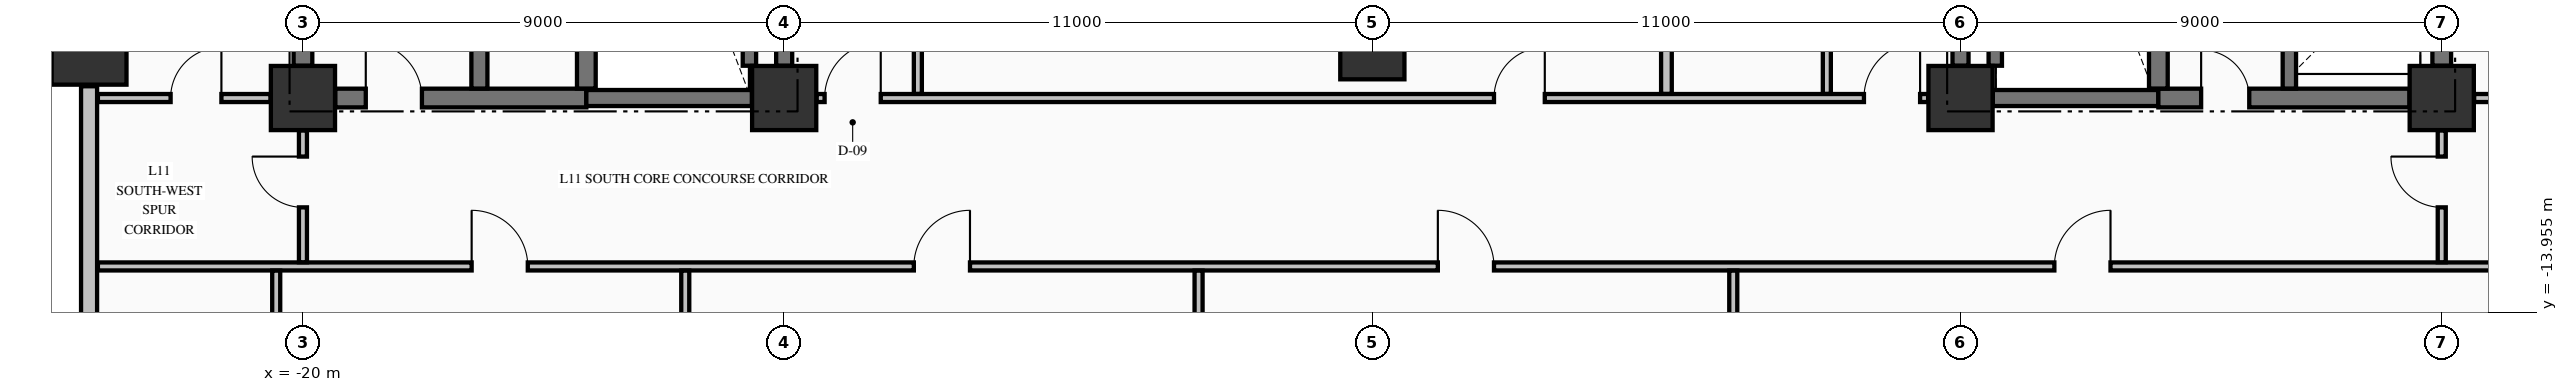
"""IFC4 building model, lengths in metres.
Left out: names, types, materials, properties, quantities, classifications, styles, units other than length and angle.
Written with IfcOpenShell. Run it as: python <this file> out.ifc"""

import sys

from ifc_helpers import new_model, si_unit, direction, frame, frame_2d, origin, origin_2d, place, context, subcontext, project, spatial, rectangle, extrude, element, fill, save


model = new_model("IFC4")
c1 = context("Model", 3, precision=1e-05, world=origin(), true_north=direction((0.0, 1.0)))
c2 = subcontext(c1, "Body", "Model", "MODEL_VIEW")
j1 = project(units=[si_unit("LENGTHUNIT", "METRE"), si_unit("PLANEANGLEUNIT", "RADIAN")], contexts=[c1])
p1 = place(None, origin())
s1 = spatial("IfcSite", under=j1, at=p1, CompositionType="ELEMENT")
p2 = place(p1, origin())
s2 = spatial("IfcBuilding", under=s1, at=p2, CompositionType="ELEMENT")
p3 = place(p2, frame((0.0, 0.0, 48.62)))
s3 = spatial("IfcBuildingStorey", under=s2, at=p3, CompositionType="ELEMENT", Elevation=48.62)
p4 = place(p3, frame((-24.0, -9.0, -0.25), z_axis=(0.0, 0.0, 1.0), x_axis=(1.0, 0.0, 0.0)))
e1 = element("IfcColumn", 1, at=p4, inside=s3, PredefinedType="COLUMN", context=c2, shape_type="SweptSolid", body=[
    extrude(rectangle(XDim=1.4, YDim=1.4, at=origin_2d()), origin(), (0.0, 0.0, 1.0), 3.395),
])
for number, where, z_axis, x_axis in (
    (2, (-20.0, -9.95, -0.25), (0.0, 0.0, 1.0), (1.0, 0.0, 0.0)),
    (3, (-11.0, -9.95, -0.25), (0.0, 0.0, 1.0), (1.0, 0.0, 0.0)),
    (4, (11.0, -9.95, -0.25), (0.0, 0.0, 1.0), (1.0, 0.0, 0.0)),
    (5, (20.0, -9.95, -0.25), (0.0, 0.0, 1.0), (1.0, 0.0, 0.0)),
    (6, (0.0, -9.0, -0.25), (0.0, 0.0, 1.0), (1.0, 0.0, 0.0)),
):
    element("IfcColumn", number, at=place(p3, frame(where, z_axis=z_axis, x_axis=x_axis)), inside=s3, PredefinedType="COLUMN", context=c2, shape_type="SweptSolid", body=[
        extrude(rectangle(XDim=1.2, YDim=1.2, at=origin_2d()), origin(), (0.0, 0.0, 1.0), 3.395),
    ])
p5 = place(p3, frame((-24.0, -9.73, 0.0), z_axis=(0.0, 0.0, 1.0), x_axis=(0.0, -1.0, 0.0)))
e7 = element("IfcWall", 7, at=p5, inside=s3, PredefinedType="STANDARD", context=c2, shape_type="SweptSolid", body=[
    extrude(rectangle(XDim=12.54, YDim=0.3, at=frame_2d((6.27, 0.0))), origin(), (0.0, 0.0, 1.0), 2.537),
])
p6 = place(p3, frame((-19.396, -9.95, 0.0), z_axis=(0.0, 0.0, 1.0), x_axis=(1.0, 0.0, 0.0)))
e8 = element("IfcWall", 8, at=p6, inside=s3, PredefinedType="SHEAR", context=c2, shape_type="SweptSolid", body=[
    extrude(rectangle(XDim=4.696, YDim=0.35, at=frame_2d((2.348, 0.0))), origin(), (0.0, 0.0, 1.0), 3.145),
])
p7 = place(p6, frame((0.571, 0.0, 0.0)))
e9 = element("IfcOpeningElement", 9, at=p7, cuts=e8, PredefinedType="OPENING", context=c2, shape_type="SweptSolid", body=[
    extrude(rectangle(XDim=1.05, YDim=2.15, at=frame_2d((0.525, 1.075))), frame((0.0, 0.185, 0.0), z_axis=(0.0, -1.0, 0.0), x_axis=(1.0, 0.0, 0.0)), (0.0, 0.0, 1.0), 0.37),
])
for number, where, z_axis, x_axis in (
    (10, (-14.7, -9.95, 0.0), (0.0, 0.0, 1.0), (1.0, 0.0, 0.0)),
    (11, (11.604, -9.95, 0.0), (0.0, 0.0, 1.0), (1.0, 0.0, 0.0)),
):
    element("IfcWall", number, at=place(p3, frame(where, z_axis=z_axis, x_axis=x_axis)), inside=s3, PredefinedType="SHEAR", context=c2, shape_type="SweptSolid", body=[
        extrude(rectangle(XDim=3.096, YDim=0.3, at=frame_2d((1.548, 0.0))), origin(), (0.0, 0.0, 1.0), 3.145),
    ])
p8 = place(p3, frame((14.7, -9.95, 0.0), z_axis=(0.0, 0.0, 1.0), x_axis=(1.0, 0.0, 0.0)))
e12 = element("IfcWall", 12, at=p8, inside=s3, PredefinedType="SHEAR", context=c2, shape_type="SweptSolid", body=[
    extrude(rectangle(XDim=4.696, YDim=0.35, at=frame_2d((2.348, 0.0))), origin(), (0.0, 0.0, 1.0), 3.145),
])
p9 = place(p8, frame((0.8, 0.0, 0.0)))
e13 = element("IfcOpeningElement", 13, at=p9, cuts=e12, PredefinedType="OPENING", context=c2, shape_type="SweptSolid", body=[
    extrude(rectangle(XDim=0.9, YDim=2.15, at=frame_2d((0.45, 1.075))), frame((0.0, 0.185, 0.0), z_axis=(0.0, -1.0, 0.0), x_axis=(1.0, 0.0, 0.0)), (0.0, 0.0, 1.0), 0.37),
])
p10 = place(p3, frame((-23.835, -13.1, 0.0), z_axis=(0.0, 0.0, 1.0), x_axis=(1.0, 0.0, 0.0)))
e14 = element("IfcWall", 14, at=p10, inside=s3, PredefinedType="PARTITIONING", context=c2, shape_type="SweptSolid", body=[
    extrude(rectangle(XDim=52.67, YDim=0.15, at=frame_2d((26.335, 0.0))), origin(), (0.0, 0.0, 1.0), 3.145),
])
p11 = place(p10, frame((6.99, 0.0, 0.0)))
e15 = element("IfcOpeningElement", 15, at=p11, cuts=e14, PredefinedType="OPENING", context=c2, shape_type="SweptSolid", body=[
    extrude(rectangle(XDim=1.05, YDim=2.15, at=frame_2d((0.525, 1.075))), frame((0.0, 0.085, 0.0), z_axis=(0.0, -1.0, 0.0), x_axis=(1.0, 0.0, 0.0)), (0.0, 0.0, 1.0), 0.17),
])
p12 = place(p10, frame((15.26, 0.0, 0.0)))
e16 = element("IfcOpeningElement", 16, at=p12, cuts=e14, PredefinedType="OPENING", context=c2, shape_type="SweptSolid", body=[
    extrude(rectangle(XDim=1.05, YDim=2.15, at=frame_2d((0.525, 1.075))), frame((0.0, 0.085, 0.0), z_axis=(0.0, -1.0, 0.0), x_axis=(1.0, 0.0, 0.0)), (0.0, 0.0, 1.0), 0.17),
])
p13 = place(p10, frame((25.06, 0.0, 0.0)))
e17 = element("IfcOpeningElement", 17, at=p13, cuts=e14, PredefinedType="OPENING", context=c2, shape_type="SweptSolid", body=[
    extrude(rectangle(XDim=1.05, YDim=2.15, at=frame_2d((0.525, 1.075))), frame((0.0, 0.085, 0.0), z_axis=(0.0, -1.0, 0.0), x_axis=(1.0, 0.0, 0.0)), (0.0, 0.0, 1.0), 0.17),
])
p14 = place(p10, frame((36.59, 0.0, 0.0)))
e18 = element("IfcOpeningElement", 18, at=p14, cuts=e14, PredefinedType="OPENING", context=c2, shape_type="SweptSolid", body=[
    extrude(rectangle(XDim=1.05, YDim=2.15, at=frame_2d((0.525, 1.075))), frame((0.0, 0.085, 0.0), z_axis=(0.0, -1.0, 0.0), x_axis=(1.0, 0.0, 0.0)), (0.0, 0.0, 1.0), 0.17),
])
p15 = place(p3, frame((-23.835, -9.95, 0.0), z_axis=(0.0, 0.0, 1.0), x_axis=(1.0, 0.0, 0.0)))
e19 = element("IfcWall", 19, at=p15, inside=s3, PredefinedType="PARTITIONING", context=c2, shape_type="SweptSolid", body=[
    extrude(rectangle(XDim=3.229, YDim=0.15, at=frame_2d((1.615, 0.0))), origin(), (0.0, 0.0, 1.0), 3.145),
])
p16 = place(p15, frame((1.36, 0.0, 0.0)))
e20 = element("IfcOpeningElement", 20, at=p16, cuts=e19, PredefinedType="OPENING", context=c2, shape_type="SweptSolid", body=[
    extrude(rectangle(XDim=0.95, YDim=2.15, at=frame_2d((0.475, 1.075))), frame((0.0, 0.085, 0.0), z_axis=(0.0, -1.0, 0.0), x_axis=(1.0, 0.0, 0.0)), (0.0, 0.0, 1.0), 0.17),
])
p17 = place(p3, frame((-10.394, -9.95, 0.0), z_axis=(0.0, 0.0, 1.0), x_axis=(1.0, 0.0, 0.0)))
e21 = element("IfcWall", 21, at=p17, inside=s3, PredefinedType="PARTITIONING", context=c2, shape_type="SweptSolid", body=[
    extrude(rectangle(XDim=20.788, YDim=0.15, at=frame_2d((10.394, 0.0))), origin(), (0.0, 0.0, 1.0), 3.145),
])
p18 = place(p17, frame((0.15, 0.0, 0.0)))
e22 = element("IfcOpeningElement", 22, at=p18, cuts=e21, PredefinedType="OPENING", context=c2, shape_type="SweptSolid", body=[
    extrude(rectangle(XDim=1.05, YDim=2.15, at=frame_2d((0.525, 1.075))), frame((0.0, 0.085, 0.0), z_axis=(0.0, -1.0, 0.0), x_axis=(1.0, 0.0, 0.0)), (0.0, 0.0, 1.0), 0.17),
])
p19 = place(p17, frame((19.588, 0.0, 0.0)))
e23 = element("IfcOpeningElement", 23, at=p19, cuts=e21, PredefinedType="OPENING", context=c2, shape_type="SweptSolid", body=[
    extrude(rectangle(XDim=1.05, YDim=2.15, at=frame_2d((0.525, 1.075))), frame((0.0, 0.085, 0.0), z_axis=(0.0, -1.0, 0.0), x_axis=(1.0, 0.0, 0.0)), (0.0, 0.0, 1.0), 0.17),
])
p20 = place(p17, frame((12.669, 0.0, 0.0)))
e24 = element("IfcOpeningElement", 24, at=p20, cuts=e21, PredefinedType="OPENING", context=c2, shape_type="SweptSolid", body=[
    extrude(rectangle(XDim=0.95, YDim=2.15, at=frame_2d((0.475, 1.075))), frame((0.0, 0.085, 0.0), z_axis=(0.0, -1.0, 0.0), x_axis=(1.0, 0.0, 0.0)), (0.0, 0.0, 1.0), 0.17),
])
p21 = place(p3, frame((20.606, -9.95, 0.0), z_axis=(0.0, 0.0, 1.0), x_axis=(1.0, 0.0, 0.0)))
e25 = element("IfcWall", 25, at=p21, inside=s3, PredefinedType="PARTITIONING", context=c2, shape_type="SweptSolid", body=[
    extrude(rectangle(XDim=8.229, YDim=0.15, at=frame_2d((4.115, 0.0))), origin(), (0.0, 0.0, 1.0), 3.145),
])
p22 = place(p21, frame((3.394, 0.0, 0.0)))
e26 = element("IfcOpeningElement", 26, at=p22, cuts=e25, PredefinedType="OPENING", context=c2, shape_type="SweptSolid", body=[
    extrude(rectangle(XDim=1.0, YDim=2.15, at=frame_2d((0.5, 1.075))), frame((0.0, 0.085, 0.0), z_axis=(0.0, -1.0, 0.0), x_axis=(1.0, 0.0, 0.0)), (0.0, 0.0, 1.0), 0.17),
])
p23 = place(p3, frame((-20.0, -9.346, 0.0), z_axis=(0.0, 0.0, 1.0), x_axis=(0.0, 1.0, 0.0)))
e27 = element("IfcWall", 27, at=p23, inside=s3, PredefinedType="SHEAR", context=c2, shape_type="SweptSolid", body=[
    extrude(rectangle(XDim=8.742, YDim=0.35, at=frame_2d((4.371, 0.0))), origin(), (0.0, 0.0, 1.0), 3.145),
])
p24 = place(p3, frame((-16.7, -9.773, 0.0), z_axis=(0.0, 0.0, 1.0), x_axis=(0.0, 1.0, 0.0)))
e28 = element("IfcWall", 28, at=p24, inside=s3, PredefinedType="SHEAR", context=c2, shape_type="SweptSolid", body=[
    extrude(rectangle(XDim=9.371, YDim=0.3, at=frame_2d((4.686, 0.0))), origin(), (0.0, 0.0, 1.0), 3.145),
])
p25 = place(p3, frame((-14.7, -9.773, 0.0), z_axis=(0.0, 0.0, 1.0), x_axis=(0.0, 1.0, 0.0)))
e29 = element("IfcWall", 29, at=p25, inside=s3, PredefinedType="SHEAR", context=c2, shape_type="SweptSolid", body=[
    extrude(rectangle(XDim=9.371, YDim=0.35, at=frame_2d((4.686, 0.0))), origin(), (0.0, 0.0, 1.0), 3.145),
])
p26 = place(p3, frame((-11.65, -9.346, 0.0), z_axis=(0.0, 0.0, 1.0), x_axis=(0.0, 1.0, 0.0)))
e30 = element("IfcWall", 30, at=p26, inside=s3, PredefinedType="SOLIDWALL", context=c2, shape_type="SweptSolid", body=[
    extrude(rectangle(XDim=8.742, YDim=0.25, at=frame_2d((4.371, 0.0))), origin(), (0.0, 0.0, 1.0), 3.145),
])
for number, where, z_axis, x_axis in (
    (31, (-11.0, -9.346, 0.0), (0.0, 0.0, 1.0), (0.0, 1.0, 0.0)),
    (32, (11.0, -9.346, 0.0), (0.0, 0.0, 1.0), (0.0, 1.0, 0.0)),
):
    element("IfcWall", number, at=place(p3, frame(where, z_axis=z_axis, x_axis=x_axis)), inside=s3, PredefinedType="SHEAR", context=c2, shape_type="SweptSolid", body=[
        extrude(rectangle(XDim=8.742, YDim=0.3, at=frame_2d((4.371, 0.0))), origin(), (0.0, 0.0, 1.0), 3.145),
    ])
p27 = place(p3, frame((11.65, -9.346, 0.0), z_axis=(0.0, 0.0, 1.0), x_axis=(0.0, 1.0, 0.0)))
e33 = element("IfcWall", 33, at=p27, inside=s3, PredefinedType="SOLIDWALL", context=c2, shape_type="SweptSolid", body=[
    extrude(rectangle(XDim=8.742, YDim=0.25, at=frame_2d((4.371, 0.0))), origin(), (0.0, 0.0, 1.0), 3.145),
])
p28 = place(p3, frame((14.7, -9.773, 0.0), z_axis=(0.0, 0.0, 1.0), x_axis=(0.0, 1.0, 0.0)))
e34 = element("IfcWall", 34, at=p28, inside=s3, PredefinedType="SHEAR", context=c2, shape_type="SweptSolid", body=[
    extrude(rectangle(XDim=9.371, YDim=0.35, at=frame_2d((4.686, 0.0))), origin(), (0.0, 0.0, 1.0), 3.145),
])
p29 = place(p3, frame((17.15, -9.773, 0.0), z_axis=(0.0, 0.0, 1.0), x_axis=(0.0, 1.0, 0.0)))
e35 = element("IfcWall", 35, at=p29, inside=s3, PredefinedType="SOLIDWALL", context=c2, shape_type="SweptSolid", body=[
    extrude(rectangle(XDim=2.596, YDim=0.25, at=frame_2d((1.298, 0.0))), origin(), (0.0, 0.0, 1.0), 3.145),
])
p30 = place(p3, frame((20.0, -9.346, 0.0), z_axis=(0.0, 0.0, 1.0), x_axis=(0.0, 1.0, 0.0)))
e36 = element("IfcWall", 36, at=p30, inside=s3, PredefinedType="SHEAR", context=c2, shape_type="SweptSolid", body=[
    extrude(rectangle(XDim=2.169, YDim=0.35, at=frame_2d((1.084, 0.0))), origin(), (0.0, 0.0, 1.0), 3.145),
])
p31 = place(p3, frame((-20.5, -22.294, 0.0), z_axis=(0.0, 0.0, 1.0), x_axis=(0.0, 1.0, 0.0)))
e37 = element("IfcWall", 37, at=p31, inside=s3, PredefinedType="PARTITIONING", context=c2, shape_type="SweptSolid", body=[
    extrude(rectangle(XDim=9.116, YDim=0.15, at=frame_2d((4.558, 0.0))), origin(), (0.0, 0.0, 1.0), 3.145),
])
p32 = place(p3, frame((-20.0, -13.022, 0.0), z_axis=(0.0, 0.0, 1.0), x_axis=(0.0, 1.0, 0.0)))
e38 = element("IfcWall", 38, at=p32, inside=s3, PredefinedType="PARTITIONING", context=c2, shape_type="SweptSolid", body=[
    extrude(rectangle(XDim=2.466, YDim=0.15, at=frame_2d((1.233, 0.0))), origin(), (0.0, 0.0, 1.0), 3.145),
])
p33 = place(p32, frame((1.027, 0.0, 0.0)))
e39 = element("IfcOpeningElement", 39, at=p33, cuts=e38, PredefinedType="OPENING", context=c2, shape_type="SweptSolid", body=[
    extrude(rectangle(XDim=0.95, YDim=2.15, at=frame_2d((0.475, 1.075))), frame((0.0, 0.085, 0.0), z_axis=(0.0, -1.0, 0.0), x_axis=(1.0, 0.0, 0.0)), (0.0, 0.0, 1.0), 0.17),
])
p34 = place(p3, frame((-12.85, -26.335, 0.0), z_axis=(0.0, 0.0, 1.0), x_axis=(0.0, 1.0, 0.0)))
e40 = element("IfcWall", 40, at=p34, inside=s3, PredefinedType="PARTITIONING", context=c2, shape_type="SweptSolid", body=[
    extrude(rectangle(XDim=13.157, YDim=0.15, at=frame_2d((6.579, 0.0))), origin(), (0.0, 0.0, 1.0), 3.145),
])
p35 = place(p3, frame((-8.5, -9.872, 0.0), z_axis=(0.0, 0.0, 1.0), x_axis=(0.0, 1.0, 0.0)))
e41 = element("IfcWall", 41, at=p35, inside=s3, PredefinedType="PARTITIONING", context=c2, shape_type="SweptSolid", body=[
    extrude(rectangle(XDim=13.369, YDim=0.15, at=frame_2d((6.685, 0.0))), origin(), (0.0, 0.0, 1.0), 3.145),
])
p36 = place(p35, frame((6.227, 0.0, 0.0)))
e42 = element("IfcOpeningElement", 42, at=p36, cuts=e41, PredefinedType="OPENING", context=c2, shape_type="SweptSolid", body=[
    extrude(rectangle(XDim=0.95, YDim=2.15, at=frame_2d((0.475, 1.075))), frame((0.0, 0.085, 0.0), z_axis=(0.0, -1.0, 0.0), x_axis=(1.0, 0.0, 0.0)), (0.0, 0.0, 1.0), 0.17),
])
p37 = place(p3, frame((-3.25, -26.335, 0.0), z_axis=(0.0, 0.0, 1.0), x_axis=(0.0, 1.0, 0.0)))
e43 = element("IfcWall", 43, at=p37, inside=s3, PredefinedType="PARTITIONING", context=c2, shape_type="SweptSolid", body=[
    extrude(rectangle(XDim=13.157, YDim=0.15, at=frame_2d((6.579, 0.0))), origin(), (0.0, 0.0, 1.0), 3.145),
])
p38 = place(p3, frame((5.5, -9.872, 0.0), z_axis=(0.0, 0.0, 1.0), x_axis=(0.0, 1.0, 0.0)))
e44 = element("IfcWall", 44, at=p38, inside=s3, PredefinedType="PARTITIONING", context=c2, shape_type="SweptSolid", body=[
    extrude(rectangle(XDim=4.969, YDim=0.2, at=frame_2d((2.484, 0.0))), origin(), (0.0, 0.0, 1.0), 3.145),
])
p39 = place(p3, frame((6.75, -26.335, 0.0), z_axis=(0.0, 0.0, 1.0), x_axis=(0.0, 1.0, 0.0)))
e45 = element("IfcWall", 45, at=p39, inside=s3, PredefinedType="PARTITIONING", context=c2, shape_type="SweptSolid", body=[
    extrude(rectangle(XDim=13.157, YDim=0.15, at=frame_2d((6.579, 0.0))), origin(), (0.0, 0.0, 1.0), 3.145),
])
p40 = place(p3, frame((8.5, -9.872, 0.0), z_axis=(0.0, 0.0, 1.0), x_axis=(0.0, 1.0, 0.0)))
e46 = element("IfcWall", 46, at=p40, inside=s3, PredefinedType="PARTITIONING", context=c2, shape_type="SweptSolid", body=[
    extrude(rectangle(XDim=4.969, YDim=0.15, at=frame_2d((2.484, 0.0))), origin(), (0.0, 0.0, 1.0), 3.145),
])
p41 = place(p40, frame((1.997, 0.0, 0.0)))
e47 = element("IfcOpeningElement", 47, at=p41, cuts=e46, PredefinedType="OPENING", context=c2, shape_type="SweptSolid", body=[
    extrude(rectangle(XDim=0.95, YDim=2.15, at=frame_2d((0.475, 1.075))), frame((0.0, 0.085, 0.0), z_axis=(0.0, -1.0, 0.0), x_axis=(1.0, 0.0, 0.0)), (0.0, 0.0, 1.0), 0.17),
])
p42 = place(p3, frame((20.0, -13.022, 0.0), z_axis=(0.0, 0.0, 1.0), x_axis=(0.0, 1.0, 0.0)))
e48 = element("IfcWall", 48, at=p42, inside=s3, PredefinedType="PARTITIONING", context=c2, shape_type="SweptSolid", body=[
    extrude(rectangle(XDim=2.466, YDim=0.15, at=frame_2d((1.233, 0.0))), origin(), (0.0, 0.0, 1.0), 2.485),
])
p43 = place(p42, frame((1.027, 0.0, 0.0)))
e49 = element("IfcOpeningElement", 49, at=p43, cuts=e48, PredefinedType="OPENING", context=c2, shape_type="SweptSolid", body=[
    extrude(rectangle(XDim=0.95, YDim=2.15, at=frame_2d((0.475, 1.075))), frame((0.0, 0.085, 0.0), z_axis=(0.0, -1.0, 0.0), x_axis=(1.0, 0.0, 0.0)), (0.0, 0.0, 1.0), 0.17),
])
p44 = place(p7, origin())
e50 = element("IfcDoor", 50, at=p44, inside=s3, OperationType="SINGLE_SWING_LEFT", PredefinedType="DOOR", context=c2, shape_type="SweptSolid", body=[
    extrude(rectangle(XDim=1.05, YDim=2.15, at=frame_2d((0.525, 1.075))), frame((0.0, 0.025, 0.0), z_axis=(0.0, -1.0, 0.0), x_axis=(1.0, 0.0, 0.0)), (0.0, 0.0, 1.0), 0.05),
])
fill(e9, e50)
p45 = place(p9, origin())
e51 = element("IfcDoor", 51, at=p45, inside=s3, OperationType="SINGLE_SWING_LEFT", PredefinedType="DOOR", context=c2, shape_type="SweptSolid", body=[
    extrude(rectangle(XDim=0.9, YDim=2.15, at=frame_2d((0.45, 1.075))), frame((0.0, 0.025, 0.0), z_axis=(0.0, -1.0, 0.0), x_axis=(1.0, 0.0, 0.0)), (0.0, 0.0, 1.0), 0.05),
])
fill(e13, e51)
p46 = place(p18, origin())
e52 = element("IfcDoor", 52, at=p46, inside=s3, OperationType="SINGLE_SWING_RIGHT", PredefinedType="DOOR", context=c2, shape_type="SweptSolid", body=[
    extrude(rectangle(XDim=1.05, YDim=2.15, at=frame_2d((0.525, 1.075))), frame((0.0, 0.025, 0.0), z_axis=(0.0, -1.0, 0.0), x_axis=(1.0, 0.0, 0.0)), (0.0, 0.0, 1.0), 0.05),
])
fill(e22, e52)
p47 = place(p19, origin())
e53 = element("IfcDoor", 53, at=p47, inside=s3, OperationType="SINGLE_SWING_RIGHT", PredefinedType="DOOR", context=c2, shape_type="SweptSolid", body=[
    extrude(rectangle(XDim=1.05, YDim=2.15, at=frame_2d((0.525, 1.075))), frame((0.0, 0.025, 0.0), z_axis=(0.0, -1.0, 0.0), x_axis=(1.0, 0.0, 0.0)), (0.0, 0.0, 1.0), 0.05),
])
fill(e23, e53)
p48 = place(p11, origin())
e54 = element("IfcDoor", 54, at=p48, inside=s3, OperationType="SINGLE_SWING_LEFT", PredefinedType="DOOR", context=c2, shape_type="SweptSolid", body=[
    extrude(rectangle(XDim=1.05, YDim=2.15, at=frame_2d((0.525, 1.075))), frame((0.0, 0.025, 0.0), z_axis=(0.0, -1.0, 0.0), x_axis=(1.0, 0.0, 0.0)), (0.0, 0.0, 1.0), 0.05),
])
fill(e15, e54)
p49 = place(p12, origin())
e55 = element("IfcDoor", 55, at=p49, inside=s3, OperationType="SINGLE_SWING_RIGHT", PredefinedType="DOOR", context=c2, shape_type="SweptSolid", body=[
    extrude(rectangle(XDim=1.05, YDim=2.15, at=frame_2d((0.525, 1.075))), frame((0.0, 0.025, 0.0), z_axis=(0.0, -1.0, 0.0), x_axis=(1.0, 0.0, 0.0)), (0.0, 0.0, 1.0), 0.05),
])
fill(e16, e55)
p50 = place(p13, origin())
e56 = element("IfcDoor", 56, at=p50, inside=s3, OperationType="SINGLE_SWING_LEFT", PredefinedType="DOOR", context=c2, shape_type="SweptSolid", body=[
    extrude(rectangle(XDim=1.05, YDim=2.15, at=frame_2d((0.525, 1.075))), frame((0.0, 0.025, 0.0), z_axis=(0.0, -1.0, 0.0), x_axis=(1.0, 0.0, 0.0)), (0.0, 0.0, 1.0), 0.05),
])
fill(e17, e56)
p51 = place(p14, origin())
e57 = element("IfcDoor", 57, at=p51, inside=s3, OperationType="SINGLE_SWING_RIGHT", PredefinedType="DOOR", context=c2, shape_type="SweptSolid", body=[
    extrude(rectangle(XDim=1.05, YDim=2.15, at=frame_2d((0.525, 1.075))), frame((0.0, 0.025, 0.0), z_axis=(0.0, -1.0, 0.0), x_axis=(1.0, 0.0, 0.0)), (0.0, 0.0, 1.0), 0.05),
])
fill(e18, e57)
p52 = place(p20, origin())
e58 = element("IfcDoor", 58, at=p52, inside=s3, OperationType="SINGLE_SWING_RIGHT", PredefinedType="DOOR", context=c2, shape_type="SweptSolid", body=[
    extrude(rectangle(XDim=0.95, YDim=2.15, at=frame_2d((0.475, 1.075))), frame((0.0, 0.025, 0.0), z_axis=(0.0, -1.0, 0.0), x_axis=(1.0, 0.0, 0.0)), (0.0, 0.0, 1.0), 0.05),
])
fill(e24, e58)
p53 = place(p33, origin())
e59 = element("IfcDoor", 59, at=p53, inside=s3, OperationType="SINGLE_SWING_RIGHT", PredefinedType="DOOR", context=c2, shape_type="SweptSolid", body=[
    extrude(rectangle(XDim=0.95, YDim=2.15, at=frame_2d((0.475, 1.075))), frame((0.0, 0.025, 0.0), z_axis=(0.0, -1.0, 0.0), x_axis=(1.0, 0.0, 0.0)), (0.0, 0.0, 1.0), 0.05),
])
fill(e39, e59)
p54 = place(p16, origin())
e60 = element("IfcDoor", 60, at=p54, inside=s3, OperationType="SINGLE_SWING_RIGHT", PredefinedType="DOOR", context=c2, shape_type="SweptSolid", body=[
    extrude(rectangle(XDim=0.95, YDim=2.15, at=frame_2d((0.475, 1.075))), frame((0.0, 0.025, 0.0), z_axis=(0.0, -1.0, 0.0), x_axis=(1.0, 0.0, 0.0)), (0.0, 0.0, 1.0), 0.05),
])
fill(e20, e60)
p55 = place(p43, origin())
e61 = element("IfcDoor", 61, at=p55, inside=s3, OperationType="SINGLE_SWING_RIGHT", PredefinedType="DOOR", context=c2, shape_type="SweptSolid", body=[
    extrude(rectangle(XDim=0.95, YDim=2.15, at=frame_2d((0.475, 1.075))), frame((0.0, 0.025, 0.0), z_axis=(0.0, -1.0, 0.0), x_axis=(1.0, 0.0, 0.0)), (0.0, 0.0, 1.0), 0.05),
])
fill(e49, e61)
save(model, sys.argv[1])
